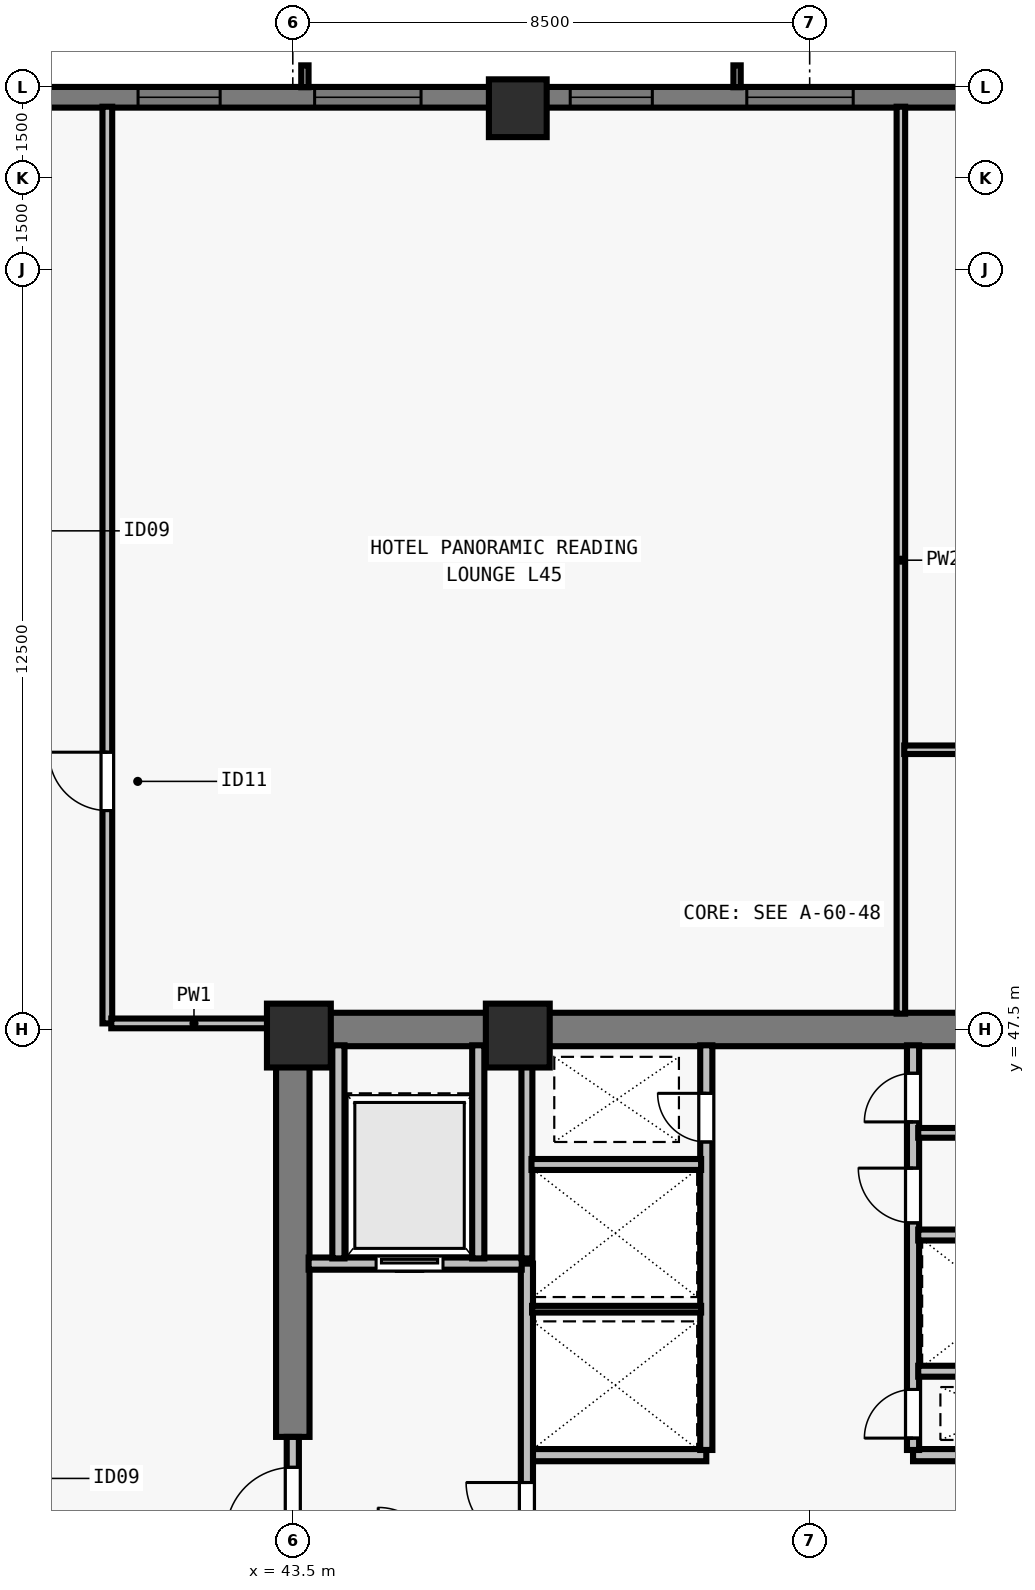
"""IFC4 building model, lengths in metres.
Left out: names, types, materials, properties, quantities, classifications, styles, units other than length and angle.
Written with IfcOpenShell. Run it as: python <this file> out.ifc"""

import sys

from ifc_helpers import new_model, si_unit, direction, frame, frame_2d, origin, origin_2d, place, context, subcontext, project, spatial, rectangle, extrude, element, fill, save


model = new_model("IFC4")
c1 = context("Model", 3, precision=1e-05, world=origin(), true_north=direction((0.0, 1.0)))
c2 = subcontext(c1, "Body", "Model", "MODEL_VIEW")
j1 = project(units=[si_unit("LENGTHUNIT", "METRE"), si_unit("PLANEANGLEUNIT", "RADIAN")], contexts=[c1])
p1 = place(None, origin())
s1 = spatial("IfcSite", under=j1, at=p1, CompositionType="ELEMENT")
p2 = place(p1, origin())
s2 = spatial("IfcBuilding", under=s1, at=p2, CompositionType="ELEMENT")
p3 = place(p2, frame((0.0, 0.0, 165.5)))
s3 = spatial("IfcBuildingStorey", under=s2, at=p3, CompositionType="ELEMENT", Elevation=165.5)
for number, where, z_axis, x_axis in (
    (1, (43.6, 47.4, 0.0), (0.0, 0.0, 1.0), (1.0, 0.0, 0.0)),
    (2, (47.2, 47.4, 0.0), (0.0, 0.0, 1.0), (1.0, 0.0, 0.0)),
):
    element("IfcColumn", number, at=place(p3, frame(where, z_axis=z_axis, x_axis=x_axis)), inside=s3, PredefinedType="COLUMN", context=c2, shape_type="SweptSolid", body=[
        extrude(rectangle(XDim=1.05, YDim=1.05, at=origin_2d()), origin(), (0.0, 0.0, 1.0), 3.5),
    ])
p4 = place(p3, frame((47.2, 62.65, 0.0), z_axis=(0.0, 0.0, 1.0), x_axis=(1.0, 0.0, 0.0)))
e3 = element("IfcColumn", 3, at=p4, inside=s3, PredefinedType="COLUMN", context=c2, shape_type="SweptSolid", body=[
    extrude(rectangle(XDim=0.95, YDim=0.95, at=origin_2d()), origin(), (0.0, 0.0, 1.0), 3.5),
])
p5 = place(p3, frame((32.0, 62.83, 0.0), z_axis=(0.0, 0.0, 1.0), x_axis=(1.0, 0.0, 0.0)))
e4 = element("IfcWall", 4, at=p5, inside=s3, PredefinedType="SOLIDWALL", context=c2, shape_type="SweptSolid", body=[
    extrude(rectangle(XDim=39.682, YDim=0.34, at=frame_2d((19.841, 0.0))), origin(), (0.0, 0.0, 1.0), 3.28),
])
p6 = place(p5, frame((3.902, 0.0, 0.8)))
e5 = element("IfcOpeningElement", 5, at=p6, cuts=e4, PredefinedType="OPENING", context=c2, shape_type="SweptSolid", body=[
    extrude(rectangle(XDim=1.75, YDim=1.66, at=frame_2d((0.875, 0.83))), frame((0.0, 0.18, 0.0), z_axis=(0.0, -1.0, 0.0), x_axis=(1.0, 0.0, 0.0)), (0.0, 0.0, 1.0), 0.36),
])
p7 = place(p5, frame((8.955, 0.0, 0.8)))
e6 = element("IfcOpeningElement", 6, at=p7, cuts=e4, PredefinedType="OPENING", context=c2, shape_type="SweptSolid", body=[
    extrude(rectangle(XDim=1.35, YDim=1.66, at=frame_2d((0.675, 0.83))), frame((0.0, 0.18, 0.0), z_axis=(0.0, -1.0, 0.0), x_axis=(1.0, 0.0, 0.0)), (0.0, 0.0, 1.0), 0.36),
])
p8 = place(p5, frame((11.859, 0.0, 0.8)))
e7 = element("IfcOpeningElement", 7, at=p8, cuts=e4, PredefinedType="OPENING", context=c2, shape_type="SweptSolid", body=[
    extrude(rectangle(XDim=1.75, YDim=1.66, at=frame_2d((0.875, 0.83))), frame((0.0, 0.18, 0.0), z_axis=(0.0, -1.0, 0.0), x_axis=(1.0, 0.0, 0.0)), (0.0, 0.0, 1.0), 0.36),
])
p9 = place(p5, frame((16.062, 0.0, 0.8)))
e8 = element("IfcOpeningElement", 8, at=p9, cuts=e4, PredefinedType="OPENING", context=c2, shape_type="SweptSolid", body=[
    extrude(rectangle(XDim=1.35, YDim=1.66, at=frame_2d((0.675, 0.83))), frame((0.0, 0.18, 0.0), z_axis=(0.0, -1.0, 0.0), x_axis=(1.0, 0.0, 0.0)), (0.0, 0.0, 1.0), 0.36),
])
p10 = place(p5, frame((18.966, 0.0, 0.8)))
e9 = element("IfcOpeningElement", 9, at=p10, cuts=e4, PredefinedType="OPENING", context=c2, shape_type="SweptSolid", body=[
    extrude(rectangle(XDim=1.75, YDim=1.66, at=frame_2d((0.875, 0.83))), frame((0.0, 0.18, 0.0), z_axis=(0.0, -1.0, 0.0), x_axis=(1.0, 0.0, 0.0)), (0.0, 0.0, 1.0), 0.36),
])
p11 = place(p5, frame((22.719, 0.0, 0.8)))
e10 = element("IfcOpeningElement", 10, at=p11, cuts=e4, PredefinedType="OPENING", context=c2, shape_type="SweptSolid", body=[
    extrude(rectangle(XDim=1.35, YDim=1.66, at=frame_2d((0.675, 0.83))), frame((0.0, 0.18, 0.0), z_axis=(0.0, -1.0, 0.0), x_axis=(1.0, 0.0, 0.0)), (0.0, 0.0, 1.0), 0.36),
])
p12 = place(p5, frame((26.073, 0.0, 0.8)))
e11 = element("IfcOpeningElement", 11, at=p12, cuts=e4, PredefinedType="OPENING", context=c2, shape_type="SweptSolid", body=[
    extrude(rectangle(XDim=1.75, YDim=1.66, at=frame_2d((0.875, 0.83))), frame((0.0, 0.18, 0.0), z_axis=(0.0, -1.0, 0.0), x_axis=(1.0, 0.0, 0.0)), (0.0, 0.0, 1.0), 0.36),
])
p13 = place(p5, frame((28.977, 0.0, 0.8)))
e12 = element("IfcOpeningElement", 12, at=p13, cuts=e4, PredefinedType="OPENING", context=c2, shape_type="SweptSolid", body=[
    extrude(rectangle(XDim=1.35, YDim=1.66, at=frame_2d((0.675, 0.83))), frame((0.0, 0.18, 0.0), z_axis=(0.0, -1.0, 0.0), x_axis=(1.0, 0.0, 0.0)), (0.0, 0.0, 1.0), 0.36),
])
p14 = place(p5, frame((33.18, 0.0, 0.8)))
e13 = element("IfcOpeningElement", 13, at=p14, cuts=e4, PredefinedType="OPENING", context=c2, shape_type="SweptSolid", body=[
    extrude(rectangle(XDim=1.75, YDim=1.66, at=frame_2d((0.875, 0.83))), frame((0.0, 0.18, 0.0), z_axis=(0.0, -1.0, 0.0), x_axis=(1.0, 0.0, 0.0)), (0.0, 0.0, 1.0), 0.36),
])
p15 = place(p3, frame((43.225, 47.5, 0.0), z_axis=(0.0, 0.0, 1.0), x_axis=(1.0, 0.0, 0.0)))
e14 = element("IfcWall", 14, at=p15, inside=s3, PredefinedType="SHEAR", context=c2, shape_type="SweptSolid", body=[
    extrude(rectangle(XDim=17.55, YDim=0.55, at=frame_2d((8.775, 0.0))), origin(), (0.0, 0.0, 1.0), 3.28),
])
p16 = place(p3, frame((43.5, 40.8, 0.0), z_axis=(0.0, 0.0, 1.0), x_axis=(0.0, 1.0, 0.0)))
e15 = element("IfcWall", 15, at=p16, inside=s3, PredefinedType="SHEAR", context=c2, shape_type="SweptSolid", body=[
    extrude(rectangle(XDim=6.435, YDim=0.55, at=frame_2d((3.218, 0.0))), origin(), (0.0, 0.0, 1.0), 3.28),
])
for number, where, z_axis, x_axis in (
    (16, (47.35, 40.5, 0.0), (0.0, 0.0, 1.0), (1.0, 0.0, 0.0)),
    (17, (53.7, 40.5, 0.0), (0.0, 0.0, 1.0), (1.0, 0.0, 0.0)),
):
    element("IfcWall", number, at=place(p3, frame(where, z_axis=z_axis, x_axis=x_axis)), inside=s3, PredefinedType="SOLIDWALL", context=c2, shape_type="SweptSolid", body=[
        extrude(rectangle(XDim=2.95, YDim=0.2, at=frame_2d((1.475, 0.0))), origin(), (0.0, 0.0, 1.0), 3.28),
    ])
p17 = place(p3, frame((50.3, 40.585, 0.0), z_axis=(0.0, 0.0, 1.0), x_axis=(0.0, 1.0, 0.0)))
e18 = element("IfcWall", 18, at=p17, inside=s3, PredefinedType="SOLIDWALL", context=c2, shape_type="SweptSolid", body=[
    extrude(rectangle(XDim=6.655, YDim=0.2, at=frame_2d((3.328, 0.0))), origin(), (0.0, 0.0, 1.0), 3.28),
])
p18 = place(p17, frame((5.065, 0.0, 0.0)))
e19 = element("IfcOpeningElement", 19, at=p18, cuts=e18, PredefinedType="OPENING", context=c2, shape_type="SweptSolid", body=[
    extrude(rectangle(XDim=0.8, YDim=2.08, at=frame_2d((0.4, 1.04))), frame((0.0, 0.11, 0.0), z_axis=(0.0, -1.0, 0.0), x_axis=(1.0, 0.0, 0.0)), (0.0, 0.0, 1.0), 0.22),
])
p19 = place(p3, frame((53.7, 40.585, 0.0), z_axis=(0.0, 0.0, 1.0), x_axis=(0.0, 1.0, 0.0)))
e20 = element("IfcWall", 20, at=p19, inside=s3, PredefinedType="SOLIDWALL", context=c2, shape_type="SweptSolid", body=[
    extrude(rectangle(XDim=6.655, YDim=0.2, at=frame_2d((3.328, 0.0))), origin(), (0.0, 0.0, 1.0), 3.28),
])
p20 = place(p19, frame((0.195, 0.0, 0.0)))
e21 = element("IfcOpeningElement", 21, at=p20, cuts=e20, PredefinedType="OPENING", context=c2, shape_type="SweptSolid", body=[
    extrude(rectangle(XDim=0.8, YDim=2.08, at=frame_2d((0.4, 1.04))), frame((0.0, 0.11, 0.0), z_axis=(0.0, -1.0, 0.0), x_axis=(1.0, 0.0, 0.0)), (0.0, 0.0, 1.0), 0.22),
])
p21 = place(p19, frame((3.735, 0.0, 0.0)))
e22 = element("IfcOpeningElement", 22, at=p21, cuts=e20, PredefinedType="OPENING", context=c2, shape_type="SweptSolid", body=[
    extrude(rectangle(XDim=0.9, YDim=2.12, at=frame_2d((0.45, 1.06))), frame((0.0, 0.11, 0.0), z_axis=(0.0, -1.0, 0.0), x_axis=(1.0, 0.0, 0.0)), (0.0, 0.0, 1.0), 0.22),
])
p22 = place(p19, frame((5.395, 0.0, 0.0)))
e23 = element("IfcOpeningElement", 23, at=p22, cuts=e20, PredefinedType="OPENING", context=c2, shape_type="SweptSolid", body=[
    extrude(rectangle(XDim=0.8, YDim=2.1, at=frame_2d((0.4, 1.05))), frame((0.0, 0.11, 0.0), z_axis=(0.0, -1.0, 0.0), x_axis=(1.0, 0.0, 0.0)), (0.0, 0.0, 1.0), 0.22),
])
p23 = place(p3, frame((43.5, 38.75, 0.0), z_axis=(0.0, 0.0, 1.0), x_axis=(0.0, 1.0, 0.0)))
e24 = element("IfcWall", 24, at=p23, inside=s3, PredefinedType="SOLIDWALL", context=c2, shape_type="SweptSolid", body=[
    extrude(rectangle(XDim=2.05, YDim=0.2, at=frame_2d((1.025, 0.0))), origin(), (0.0, 0.0, 1.0), 3.28),
])
p24 = place(p23, frame((0.45, 0.0, 0.0)))
e25 = element("IfcOpeningElement", 25, at=p24, cuts=e24, PredefinedType="OPENING", context=c2, shape_type="SweptSolid", body=[
    extrude(rectangle(XDim=1.1, YDim=2.15, at=frame_2d((0.55, 1.075))), frame((0.0, 0.11, 0.0), z_axis=(0.0, -1.0, 0.0), x_axis=(1.0, 0.0, 0.0)), (0.0, 0.0, 1.0), 0.22),
])
p25 = place(p3, frame((47.35, 38.785, 0.0), z_axis=(0.0, 0.0, 1.0), x_axis=(0.0, 1.0, 0.0)))
e26 = element("IfcWall", 26, at=p25, inside=s3, PredefinedType="SOLIDWALL", context=c2, shape_type="SweptSolid", body=[
    extrude(rectangle(XDim=4.865, YDim=0.2, at=frame_2d((2.433, 0.0))), origin(), (0.0, 0.0, 1.0), 3.28),
])
p26 = place(p25, frame((0.265, 0.0, 0.0)))
e27 = element("IfcOpeningElement", 27, at=p26, cuts=e26, PredefinedType="OPENING", context=c2, shape_type="SweptSolid", body=[
    extrude(rectangle(XDim=1.0, YDim=2.15, at=frame_2d((0.5, 1.075))), frame((0.0, 0.11, 0.0), z_axis=(0.0, -1.0, 0.0), x_axis=(1.0, 0.0, 0.0)), (0.0, 0.0, 1.0), 0.22),
])
p27 = place(p3, frame((43.76, 43.65, 0.0), z_axis=(0.0, 0.0, 1.0), x_axis=(1.0, 0.0, 0.0)))
e28 = element("IfcWall", 28, at=p27, inside=s3, PredefinedType="SOLIDWALL", context=c2, shape_type="SweptSolid", body=[
    extrude(rectangle(XDim=3.505, YDim=0.2, at=frame_2d((1.752, 0.0))), origin(), (0.0, 0.0, 1.0), 3.28),
])
p28 = place(p27, frame((1.11, 0.0, 0.0)))
e29 = element("IfcOpeningElement", 29, at=p28, cuts=e28, PredefinedType="OPENING", context=c2, shape_type="SweptSolid", body=[
    extrude(rectangle(XDim=1.1, YDim=2.2, at=frame_2d((0.55, 1.1))), frame((0.0, 0.11, 0.0), z_axis=(0.0, -1.0, 0.0), x_axis=(1.0, 0.0, 0.0)), (0.0, 0.0, 1.0), 0.22),
])
for number, where, z_axis, x_axis in (
    (30, (46.55, 43.735, 0.0), (0.0, 0.0, 1.0), (0.0, 1.0, 0.0)),
    (31, (44.25, 43.735, 0.0), (0.0, 0.0, 1.0), (0.0, 1.0, 0.0)),
):
    element("IfcWall", number, at=place(p3, frame(where, z_axis=z_axis, x_axis=x_axis)), inside=s3, PredefinedType="SOLIDWALL", context=c2, shape_type="SweptSolid", body=[
        extrude(rectangle(XDim=3.505, YDim=0.2, at=frame_2d((1.752, 0.0))), origin(), (0.0, 0.0, 1.0), 3.28),
    ])
p29 = place(p3, frame((47.35, 43.735, 0.0), z_axis=(0.0, 0.0, 1.0), x_axis=(0.0, 1.0, 0.0)))
e32 = element("IfcWall", 32, at=p29, inside=s3, PredefinedType="SOLIDWALL", context=c2, shape_type="SweptSolid", body=[
    extrude(rectangle(XDim=3.505, YDim=0.18, at=frame_2d((1.752, 0.0))), origin(), (0.0, 0.0, 1.0), 3.28),
])
p30 = place(p3, frame((47.435, 42.9, 0.0), z_axis=(0.0, 0.0, 1.0), x_axis=(1.0, 0.0, 0.0)))
e33 = element("IfcWall", 33, at=p30, inside=s3, PredefinedType="PARTITIONING", context=c2, shape_type="SweptSolid", body=[
    extrude(rectangle(XDim=2.78, YDim=0.11, at=frame_2d((1.39, 0.0))), origin(), (0.0, 0.0, 1.0), 3.28),
])
p31 = place(p3, frame((47.425, 45.28, 0.0), z_axis=(0.0, 0.0, 1.0), x_axis=(1.0, 0.0, 0.0)))
e34 = element("IfcWall", 34, at=p31, inside=s3, PredefinedType="SOLIDWALL", context=c2, shape_type="SweptSolid", body=[
    extrude(rectangle(XDim=2.79, YDim=0.18, at=frame_2d((1.395, 0.0))), origin(), (0.0, 0.0, 1.0), 3.28),
])
p32 = place(p3, frame((53.785, 41.88, 0.0), z_axis=(0.0, 0.0, 1.0), x_axis=(1.0, 0.0, 0.0)))
e35 = element("IfcWall", 35, at=p32, inside=s3, PredefinedType="SOLIDWALL", context=c2, shape_type="SweptSolid", body=[
    extrude(rectangle(XDim=2.78, YDim=0.18, at=frame_2d((1.39, 0.0))), origin(), (0.0, 0.0, 1.0), 3.28),
])
p33 = place(p3, frame((53.785, 44.12, 0.0), z_axis=(0.0, 0.0, 1.0), x_axis=(1.0, 0.0, 0.0)))
e36 = element("IfcWall", 36, at=p33, inside=s3, PredefinedType="SOLIDWALL", context=c2, shape_type="SweptSolid", body=[
    extrude(rectangle(XDim=2.79, YDim=0.18, at=frame_2d((1.395, 0.0))), origin(), (0.0, 0.0, 1.0), 3.28),
])
p34 = place(p3, frame((53.785, 45.8, 0.0), z_axis=(0.0, 0.0, 1.0), x_axis=(1.0, 0.0, 0.0)))
e37 = element("IfcWall", 37, at=p34, inside=s3, PredefinedType="PARTITIONING", context=c2, shape_type="SweptSolid", body=[
    extrude(rectangle(XDim=2.79, YDim=0.16, at=frame_2d((1.395, 0.0))), origin(), (0.0, 0.0, 1.0), 3.28),
])
p35 = place(p3, frame((40.45, 47.6, 0.0), z_axis=(0.0, 0.0, 1.0), x_axis=(0.0, 1.0, 0.0)))
e38 = element("IfcWall", 38, at=p35, inside=s3, PredefinedType="PARTITIONING", context=c2, shape_type="SweptSolid", body=[
    extrude(rectangle(XDim=15.075, YDim=0.16, at=frame_2d((7.538, 0.0))), origin(), (0.0, 0.0, 1.0), 2.555),
])
p36 = place(p35, frame((3.5, 0.0, 0.0)))
e39 = element("IfcOpeningElement", 39, at=p36, cuts=e38, PredefinedType="OPENING", context=c2, shape_type="SweptSolid", body=[
    extrude(rectangle(XDim=0.96, YDim=2.12, at=frame_2d((0.48, 1.06))), frame((0.0, 0.09, 0.0), z_axis=(0.0, -1.0, 0.0), x_axis=(1.0, 0.0, 0.0)), (0.0, 0.0, 1.0), 0.18),
])
p37 = place(p3, frame((40.515, 47.6, 0.0), z_axis=(0.0, 0.0, 1.0), x_axis=(1.0, 0.0, 0.0)))
e40 = element("IfcWall", 40, at=p37, inside=s3, PredefinedType="PARTITIONING", context=c2, shape_type="SweptSolid", body=[
    extrude(rectangle(XDim=2.72, YDim=0.16, at=frame_2d((1.36, 0.0))), origin(), (0.0, 0.0, 1.0), 3.28),
])
p38 = place(p3, frame((53.5, 47.76, 0.0), z_axis=(0.0, 0.0, 1.0), x_axis=(0.0, 1.0, 0.0)))
e41 = element("IfcWall", 41, at=p38, inside=s3, PredefinedType="PARTITIONING", context=c2, shape_type="SweptSolid", body=[
    extrude(rectangle(XDim=14.915, YDim=0.14, at=frame_2d((7.458, 0.0))), origin(), (0.0, 0.0, 1.0), 2.896),
])
p39 = place(p3, frame((53.555, 52.1, 0.0), z_axis=(0.0, 0.0, 1.0), x_axis=(1.0, 0.0, 0.0)))
e42 = element("IfcWall", 42, at=p39, inside=s3, PredefinedType="PARTITIONING", context=c2, shape_type="SweptSolid", body=[
    extrude(rectangle(XDim=9.03, YDim=0.14, at=frame_2d((4.515, 0.0))), origin(), (0.0, 0.0, 1.0), 3.28),
])
p40 = place(p7, origin())
e43 = element("IfcWindow", 43, at=p40, inside=s3, PartitioningType="SINGLE_PANEL", PredefinedType="WINDOW", context=c2, shape_type="SweptSolid", body=[
    extrude(rectangle(XDim=1.35, YDim=1.66, at=frame_2d((0.675, 0.83))), frame((0.0, -0.05, 0.0), z_axis=(0.0, -1.0, 0.0), x_axis=(1.0, 0.0, 0.0)), (0.0, 0.0, 1.0), 0.06),
])
fill(e6, e43)
p41 = place(p8, origin())
e44 = element("IfcWindow", 44, at=p41, inside=s3, PartitioningType="SINGLE_PANEL", PredefinedType="WINDOW", context=c2, shape_type="SweptSolid", body=[
    extrude(rectangle(XDim=1.75, YDim=1.66, at=frame_2d((0.875, 0.83))), frame((0.0, -0.05, 0.0), z_axis=(0.0, -1.0, 0.0), x_axis=(1.0, 0.0, 0.0)), (0.0, 0.0, 1.0), 0.06),
])
fill(e7, e44)
p42 = place(p9, origin())
e45 = element("IfcWindow", 45, at=p42, inside=s3, PartitioningType="SINGLE_PANEL", PredefinedType="WINDOW", context=c2, shape_type="SweptSolid", body=[
    extrude(rectangle(XDim=1.35, YDim=1.66, at=frame_2d((0.675, 0.83))), frame((0.0, -0.05, 0.0), z_axis=(0.0, -1.0, 0.0), x_axis=(1.0, 0.0, 0.0)), (0.0, 0.0, 1.0), 0.06),
])
fill(e8, e45)
p43 = place(p10, origin())
e46 = element("IfcWindow", 46, at=p43, inside=s3, PartitioningType="SINGLE_PANEL", PredefinedType="WINDOW", context=c2, shape_type="SweptSolid", body=[
    extrude(rectangle(XDim=1.75, YDim=1.66, at=frame_2d((0.875, 0.83))), frame((0.0, -0.05, 0.0), z_axis=(0.0, -1.0, 0.0), x_axis=(1.0, 0.0, 0.0)), (0.0, 0.0, 1.0), 0.06),
])
fill(e9, e46)
p44 = place(p24, origin())
e47 = element("IfcDoor", 47, at=p44, inside=s3, OperationType="SINGLE_SWING_LEFT", PredefinedType="DOOR", context=c2, shape_type="SweptSolid", body=[
    extrude(rectangle(XDim=1.1, YDim=2.15, at=frame_2d((0.55, 1.075))), frame((0.0, 0.025, 0.0), z_axis=(0.0, -1.0, 0.0), x_axis=(1.0, 0.0, 0.0)), (0.0, 0.0, 1.0), 0.05),
])
fill(e25, e47)
p45 = place(p26, origin())
e48 = element("IfcDoor", 48, at=p45, inside=s3, OperationType="SINGLE_SWING_RIGHT", PredefinedType="DOOR", context=c2, shape_type="SweptSolid", body=[
    extrude(rectangle(XDim=1.0, YDim=2.15, at=frame_2d((0.5, 1.075))), frame((0.0, 0.025, 0.0), z_axis=(0.0, -1.0, 0.0), x_axis=(1.0, 0.0, 0.0)), (0.0, 0.0, 1.0), 0.05),
])
fill(e27, e48)
p46 = place(p28, origin())
e49 = element("IfcDoor", 49, at=p46, inside=s3, OperationType="SLIDING_TO_LEFT", PredefinedType="DOOR", context=c2, shape_type="SweptSolid", body=[
    extrude(rectangle(XDim=1.1, YDim=2.2, at=frame_2d((0.55, 1.1))), frame((0.0, 0.025, 0.0), z_axis=(0.0, -1.0, 0.0), x_axis=(1.0, 0.0, 0.0)), (0.0, 0.0, 1.0), 0.05),
])
fill(e29, e49)
p47 = place(p18, origin())
e50 = element("IfcDoor", 50, at=p47, inside=s3, OperationType="SINGLE_SWING_RIGHT", PredefinedType="DOOR", context=c2, shape_type="SweptSolid", body=[
    extrude(rectangle(XDim=0.8, YDim=2.08, at=frame_2d((0.4, 1.04))), frame((0.0, 0.025, 0.0), z_axis=(0.0, -1.0, 0.0), x_axis=(1.0, 0.0, 0.0)), (0.0, 0.0, 1.0), 0.05),
])
fill(e19, e50)
p48 = place(p20, origin())
e51 = element("IfcDoor", 51, at=p48, inside=s3, OperationType="SINGLE_SWING_LEFT", PredefinedType="DOOR", context=c2, shape_type="SweptSolid", body=[
    extrude(rectangle(XDim=0.8, YDim=2.08, at=frame_2d((0.4, 1.04))), frame((0.0, 0.025, 0.0), z_axis=(0.0, -1.0, 0.0), x_axis=(1.0, 0.0, 0.0)), (0.0, 0.0, 1.0), 0.05),
])
fill(e21, e51)
p49 = place(p21, origin())
e52 = element("IfcDoor", 52, at=p49, inside=s3, OperationType="SINGLE_SWING_RIGHT", PredefinedType="DOOR", context=c2, shape_type="SweptSolid", body=[
    extrude(rectangle(XDim=0.9, YDim=2.12, at=frame_2d((0.45, 1.06))), frame((0.0, 0.025, 0.0), z_axis=(0.0, -1.0, 0.0), x_axis=(1.0, 0.0, 0.0)), (0.0, 0.0, 1.0), 0.05),
])
fill(e22, e52)
p50 = place(p22, origin())
e53 = element("IfcDoor", 53, at=p50, inside=s3, OperationType="SINGLE_SWING_LEFT", PredefinedType="DOOR", context=c2, shape_type="SweptSolid", body=[
    extrude(rectangle(XDim=0.8, YDim=2.1, at=frame_2d((0.4, 1.05))), frame((0.0, 0.025, 0.0), z_axis=(0.0, -1.0, 0.0), x_axis=(1.0, 0.0, 0.0)), (0.0, 0.0, 1.0), 0.05),
])
fill(e23, e53)
p51 = place(p36, origin())
e54 = element("IfcDoor", 54, at=p51, inside=s3, OperationType="SINGLE_SWING_RIGHT", PredefinedType="DOOR", context=c2, shape_type="SweptSolid", body=[
    extrude(rectangle(XDim=0.96, YDim=2.12, at=frame_2d((0.48, 1.06))), frame((0.0, 0.025, 0.0), z_axis=(0.0, -1.0, 0.0), x_axis=(1.0, 0.0, 0.0)), (0.0, 0.0, 1.0), 0.05),
])
fill(e39, e54)
save(model, sys.argv[1])
